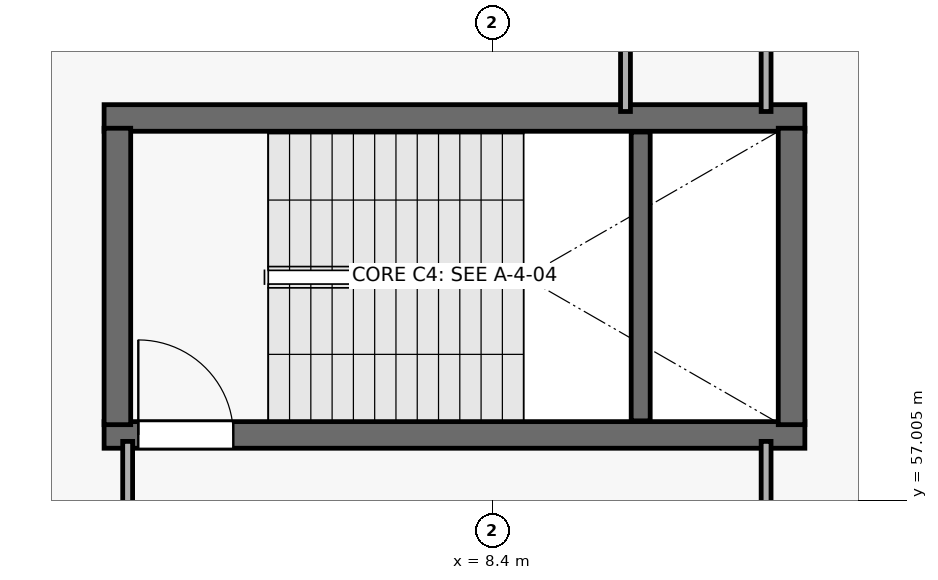
"""IFC4 building model, lengths in metres.
Left out: names, types, materials, properties, quantities, classifications, styles, units other than length and angle.
Written with IfcOpenShell. Run it as: python <this file> out.ifc"""

import sys

from ifc_helpers import new_model, si_unit, direction, frame, frame_2d, origin, place, context, subcontext, project, spatial, rectangle, extrude, element, fill, save


model = new_model("IFC4")
c1 = context("Model", 3, precision=1e-05, world=origin(), true_north=direction((0.0, 1.0)))
c2 = subcontext(c1, "Body", "Model", "MODEL_VIEW")
j1 = project(units=[si_unit("LENGTHUNIT", "METRE"), si_unit("PLANEANGLEUNIT", "RADIAN")], contexts=[c1])
p1 = place(None, origin())
s1 = spatial("IfcSite", under=j1, at=p1, CompositionType="ELEMENT")
p2 = place(p1, origin())
s2 = spatial("IfcBuilding", under=s1, at=p2, CompositionType="ELEMENT")
p3 = place(p2, frame((0.0, 0.0, 5.4)))
s3 = spatial("IfcBuildingStorey", under=s2, at=p3, CompositionType="ELEMENT", Elevation=5.4)
p4 = place(p3, frame((3.29, 57.865, 0.0), z_axis=(0.0, 0.0, 1.0), x_axis=(1.0, 0.0, 0.0)))
e1 = element("IfcWall", 1, at=p4, inside=s3, PredefinedType="SHEAR", context=c2, shape_type="SweptSolid", body=[
    extrude(rectangle(XDim=9.22, YDim=0.35, at=frame_2d((4.61, 0.0))), origin(), (0.0, 0.0, 1.0), 4.52),
])
p5 = place(p4, frame((0.45, 0.0, 0.0)))
e2 = element("IfcOpeningElement", 2, at=p5, cuts=e1, PredefinedType="OPENING", context=c2, shape_type="SweptSolid", body=[
    extrude(rectangle(XDim=1.25, YDim=2.2, at=frame_2d((0.625, 1.1))), frame((0.0, 0.185, 0.0), z_axis=(0.0, -1.0, 0.0), x_axis=(1.0, 0.0, 0.0)), (0.0, 0.0, 1.0), 0.37),
])
p6 = place(p3, frame((12.51, 62.035, 0.0), z_axis=(0.0, 0.0, 1.0), x_axis=(-1.0, 0.0, 0.0)))
e3 = element("IfcWall", 3, at=p6, inside=s3, PredefinedType="SHEAR", context=c2, shape_type="SweptSolid", body=[
    extrude(rectangle(XDim=9.22, YDim=0.35, at=frame_2d((4.61, 0.0))), origin(), (0.0, 0.0, 1.0), 4.52),
])
for number, where, z_axis, x_axis in (
    (4, (3.465, 58.0, 0.0), (0.0, 0.0, 1.0), (0.0, 1.0, 0.0)),
    (5, (12.335, 61.9, 0.0), (0.0, 0.0, 1.0), (0.0, -1.0, 0.0)),
):
    element("IfcWall", number, at=place(p3, frame(where, z_axis=z_axis, x_axis=x_axis)), inside=s3, PredefinedType="SHEAR", context=c2, shape_type="SweptSolid", body=[
        extrude(rectangle(XDim=3.9, YDim=0.35, at=frame_2d((1.95, 0.0))), origin(), (0.0, 0.0, 1.0), 4.52),
    ])
p7 = place(p3, frame((10.35, 58.05, 0.0), z_axis=(0.0, 0.0, 1.0), x_axis=(0.0, 1.0, 0.0)))
e6 = element("IfcWall", 6, at=p7, inside=s3, PredefinedType="SHEAR", context=c2, shape_type="SweptSolid", body=[
    extrude(rectangle(XDim=3.8, YDim=0.25, at=frame_2d((1.9, 0.0))), origin(), (0.0, 0.0, 1.0), 2.22),
])
for number, where, z_axis, x_axis in (
    (7, (12.0, 62.12, 0.0), (0.0, 0.0, 1.0), (0.0, 1.0, 0.0)),
    (8, (10.15, 81.8, 0.0), (0.0, 0.0, 1.0), (0.0, -1.0, 0.0)),
):
    element("IfcWall", number, at=place(p3, frame(where, z_axis=z_axis, x_axis=x_axis)), inside=s3, PredefinedType="PARTITIONING", context=c2, shape_type="SweptSolid", body=[
        extrude(rectangle(XDim=19.68, YDim=0.13, at=frame_2d((9.84, 0.0))), origin(), (0.0, 0.0, 1.0), 4.52),
    ])
p8 = place(p3, frame((3.6, 57.78, 0.0), z_axis=(0.0, 0.0, 1.0), x_axis=(0.0, -1.0, 0.0)))
e9 = element("IfcWall", 9, at=p8, inside=s3, PredefinedType="PARTITIONING", context=c2, shape_type="SweptSolid", body=[
    extrude(rectangle(XDim=5.035, YDim=0.13, at=frame_2d((2.518, 0.0))), origin(), (0.0, 0.0, 1.0), 4.52),
])
p9 = place(p3, frame((12.0, 54.8, 0.0), z_axis=(0.0, 0.0, 1.0), x_axis=(0.0, 1.0, 0.0)))
e10 = element("IfcWall", 10, at=p9, inside=s3, PredefinedType="PARTITIONING", context=c2, shape_type="SweptSolid", body=[
    extrude(rectangle(XDim=2.98, YDim=0.13, at=frame_2d((1.49, 0.0))), origin(), (0.0, 0.0, 1.0), 4.52),
])
p10 = place(p5, origin())
e11 = element("IfcDoor", 11, at=p10, inside=s3, OperationType="SINGLE_SWING_LEFT", PredefinedType="DOOR", context=c2, shape_type="SweptSolid", body=[
    extrude(rectangle(XDim=1.25, YDim=2.2, at=frame_2d((0.625, 1.1))), frame((0.0, 0.025, 0.0), z_axis=(0.0, -1.0, 0.0), x_axis=(1.0, 0.0, 0.0)), (0.0, 0.0, 1.0), 0.05),
])
fill(e2, e11)
save(model, sys.argv[1])
